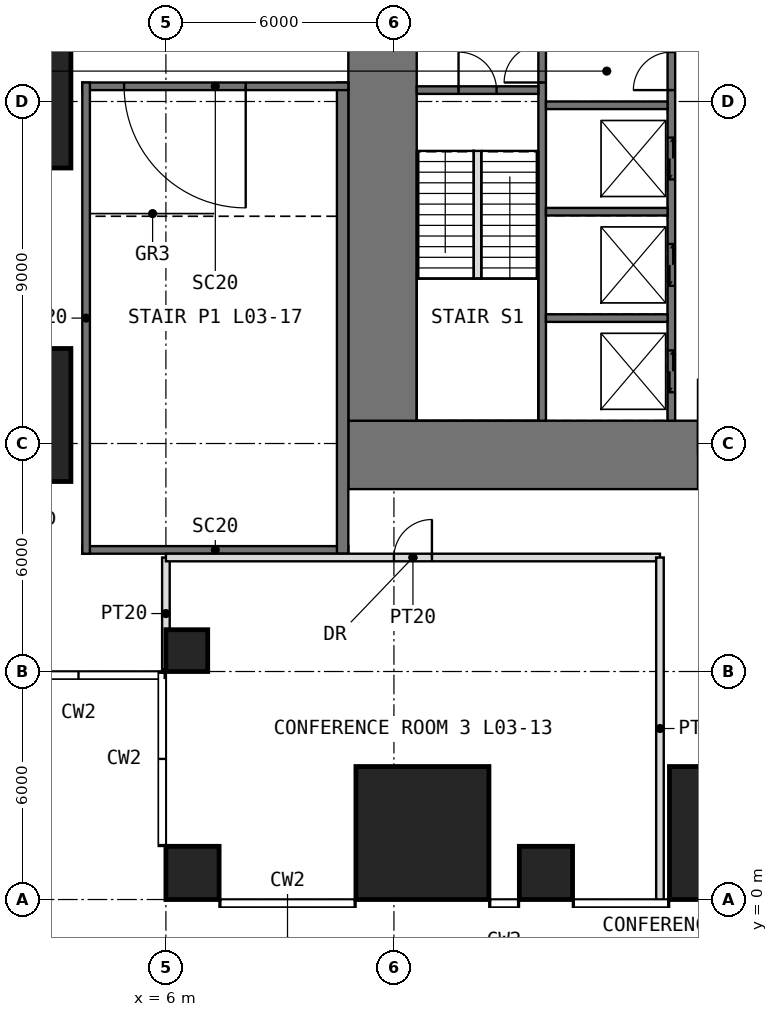
"""IFC4 building model, lengths in metres.
Left out: names, types, materials, properties, quantities, classifications, styles, units other than length and angle.
Written with IfcOpenShell. Run it as: python <this file> out.ifc"""

import sys

from ifc_helpers import new_model, si_unit, direction, frame, frame_2d, origin, origin_2d, place, context, subcontext, project, spatial, rectangle, extrude, element, fill, save


model = new_model("IFC4")
c1 = context("Model", 3, precision=1e-05, world=origin(), true_north=direction((0.0, 1.0)))
c2 = subcontext(c1, "Body", "Model", "MODEL_VIEW")
j1 = project(units=[si_unit("LENGTHUNIT", "METRE"), si_unit("PLANEANGLEUNIT", "RADIAN")], contexts=[c1])
p1 = place(None, origin())
s1 = spatial("IfcSite", under=j1, at=p1, CompositionType="ELEMENT")
p2 = place(p1, origin())
s2 = spatial("IfcBuilding", under=s1, at=p2, CompositionType="ELEMENT")
p3 = place(p2, frame((0.0, 0.0, 18.0)))
s3 = spatial("IfcBuildingStorey", under=s2, at=p3, CompositionType="ELEMENT", Elevation=18.0)
p4 = place(p3, frame((6.7, 0.7, 0.0), z_axis=(0.0, 0.0, 1.0), x_axis=(1.0, 0.0, 0.0)))
e1 = element("IfcColumn", 1, at=p4, inside=s3, PredefinedType="COLUMN", context=c2, shape_type="SweptSolid", body=[
    extrude(rectangle(XDim=1.4, YDim=1.4, at=origin_2d()), origin(), (0.0, 0.0, 1.0), 4.5),
])
p5 = place(p3, frame((12.75, 1.75, 0.0), z_axis=(0.0, 0.0, 1.0), x_axis=(1.0, 0.0, 0.0)))
e2 = element("IfcColumn", 2, at=p5, inside=s3, PredefinedType="COLUMN", context=c2, shape_type="SweptSolid", body=[
    extrude(rectangle(XDim=3.5, YDim=3.5, at=origin_2d()), origin(), (0.0, 0.0, 1.0), 4.5),
])
p6 = place(p3, frame((16.0, 0.7, 0.0), z_axis=(0.0, 0.0, 1.0), x_axis=(1.0, 0.0, 0.0)))
e3 = element("IfcColumn", 3, at=p6, inside=s3, PredefinedType="COLUMN", context=c2, shape_type="SweptSolid", body=[
    extrude(rectangle(XDim=1.4, YDim=1.4, at=origin_2d()), origin(), (0.0, 0.0, 1.0), 4.5),
])
p7 = place(p3, frame((21.0, 1.75, 0.0), z_axis=(0.0, 0.0, 1.0), x_axis=(1.0, 0.0, 0.0)))
e4 = element("IfcColumn", 4, at=p7, inside=s3, PredefinedType="COLUMN", context=c2, shape_type="SweptSolid", body=[
    extrude(rectangle(XDim=3.5, YDim=3.5, at=origin_2d()), origin(), (0.0, 0.0, 1.0), 4.5),
])
p8 = place(p3, frame((6.55, 6.55, 0.0), z_axis=(0.0, 0.0, 1.0), x_axis=(1.0, 0.0, 0.0)))
e5 = element("IfcColumn", 5, at=p8, inside=s3, PredefinedType="COLUMN", context=c2, shape_type="SweptSolid", body=[
    extrude(rectangle(XDim=1.1, YDim=1.1, at=origin_2d()), origin(), (0.0, 0.0, 1.0), 4.5),
])
for number, where, z_axis, x_axis in (
    (6, (1.75, 12.75, 0.0), (0.0, 0.0, 1.0), (1.0, 0.0, 0.0)),
    (7, (1.75, 21.0, 0.0), (0.0, 0.0, 1.0), (1.0, 0.0, 0.0)),
):
    element("IfcColumn", number, at=place(p3, frame(where, z_axis=z_axis, x_axis=x_axis)), inside=s3, PredefinedType="COLUMN", context=c2, shape_type="SweptSolid", body=[
        extrude(rectangle(XDim=3.5, YDim=3.5, at=origin_2d()), origin(), (0.0, 0.0, 1.0), 4.5),
    ])
p9 = place(p3, frame((10.8, 11.7, -0.2), z_axis=(0.0, 0.0, 1.0), x_axis=(1.0, 0.0, 0.0)))
e8 = element("IfcWall", 8, at=p9, inside=s3, PredefinedType="SHEAR", context=c2, shape_type="SweptSolid", body=[
    extrude(rectangle(XDim=20.4, YDim=1.8, at=frame_2d((10.2, 0.0))), origin(), (0.0, 0.0, 1.0), 4.65),
])
p10 = place(p9, frame((9.2, 0.0, 0.2)))
e9 = element("IfcOpeningElement", 9, at=p10, cuts=e8, PredefinedType="OPENING", context=c2, shape_type="SweptSolid", body=[
    extrude(rectangle(XDim=2.0, YDim=2.2, at=frame_2d((1.0, 1.1))), frame((0.0, 0.91, 0.0), z_axis=(0.0, -1.0, 0.0), x_axis=(1.0, 0.0, 0.0)), (0.0, 0.0, 1.0), 1.82),
])
p11 = place(p3, frame((11.7, 12.6, -0.2), z_axis=(0.0, 0.0, 1.0), x_axis=(0.0, 1.0, 0.0)))
e10 = element("IfcWall", 10, at=p11, inside=s3, PredefinedType="SHEAR", context=c2, shape_type="SweptSolid", body=[
    extrude(rectangle(XDim=16.8, YDim=1.8, at=frame_2d((8.4, 0.0))), origin(), (0.0, 0.0, 1.0), 4.65),
])
p12 = place(p11, frame((9.9, 0.0, 0.2)))
e11 = element("IfcOpeningElement", 11, at=p12, cuts=e10, PredefinedType="OPENING", context=c2, shape_type="SweptSolid", body=[
    extrude(rectangle(XDim=1.0, YDim=2.2, at=frame_2d((0.5, 1.1))), frame((0.0, 0.91, 0.0), z_axis=(0.0, -1.0, 0.0), x_axis=(1.0, 0.0, 0.0)), (0.0, 0.0, 1.0), 1.82),
])
p13 = place(p3, frame((15.9, 12.6, -0.2), z_axis=(0.0, 0.0, 1.0), x_axis=(0.0, 1.0, 0.0)))
e12 = element("IfcWall", 12, at=p13, inside=s3, PredefinedType="SHEAR", context=c2, shape_type="SweptSolid", body=[
    extrude(rectangle(XDim=16.8, YDim=0.2, at=frame_2d((8.4, 0.0))), origin(), (0.0, 0.0, 1.0), 4.65),
])
p14 = place(p13, frame((8.9, 0.0, 0.2)))
e13 = element("IfcOpeningElement", 13, at=p14, cuts=e12, PredefinedType="OPENING", context=c2, shape_type="SweptSolid", body=[
    extrude(rectangle(XDim=1.0, YDim=2.2, at=frame_2d((0.5, 1.1))), frame((0.0, 0.11, 0.0), z_axis=(0.0, -1.0, 0.0), x_axis=(1.0, 0.0, 0.0)), (0.0, 0.0, 1.0), 0.22),
])
p15 = place(p3, frame((19.3, 12.6, -0.2), z_axis=(0.0, 0.0, 1.0), x_axis=(0.0, 1.0, 0.0)))
e14 = element("IfcWall", 14, at=p15, inside=s3, PredefinedType="SHEAR", context=c2, shape_type="SweptSolid", body=[
    extrude(rectangle(XDim=16.8, YDim=0.2, at=frame_2d((8.4, 0.0))), origin(), (0.0, 0.0, 1.0), 4.65),
])
p16 = place(p15, frame((8.7, 0.0, 0.2)))
e15 = element("IfcOpeningElement", 15, at=p16, cuts=e14, PredefinedType="OPENING", context=c2, shape_type="SweptSolid", body=[
    extrude(rectangle(XDim=1.0, YDim=2.2, at=frame_2d((0.5, 1.1))), frame((0.0, 0.11, 0.0), z_axis=(0.0, -1.0, 0.0), x_axis=(1.0, 0.0, 0.0)), (0.0, 0.0, 1.0), 0.22),
])
p17 = place(p15, frame((10.85, 0.0, 0.2)))
e16 = element("IfcOpeningElement", 16, at=p17, cuts=e14, PredefinedType="OPENING", context=c2, shape_type="SweptSolid", body=[
    extrude(rectangle(XDim=0.9, YDim=2.2, at=frame_2d((0.45, 1.1))), frame((0.0, 0.11, 0.0), z_axis=(0.0, -1.0, 0.0), x_axis=(1.0, 0.0, 0.0)), (0.0, 0.0, 1.0), 0.22),
])
p18 = place(p15, frame((13.3, 0.0, 0.2)))
e17 = element("IfcOpeningElement", 17, at=p18, cuts=e14, PredefinedType="OPENING", context=c2, shape_type="SweptSolid", body=[
    extrude(rectangle(XDim=1.0, YDim=2.2, at=frame_2d((0.5, 1.1))), frame((0.0, 0.11, 0.0), z_axis=(0.0, -1.0, 0.0), x_axis=(1.0, 0.0, 0.0)), (0.0, 0.0, 1.0), 0.22),
])
p19 = place(p15, frame((15.55, 0.0, 0.2)))
e18 = element("IfcOpeningElement", 18, at=p19, cuts=e14, PredefinedType="OPENING", context=c2, shape_type="SweptSolid", body=[
    extrude(rectangle(XDim=0.9, YDim=2.2, at=frame_2d((0.45, 1.1))), frame((0.0, 0.11, 0.0), z_axis=(0.0, -1.0, 0.0), x_axis=(1.0, 0.0, 0.0)), (0.0, 0.0, 1.0), 0.22),
])
p20 = place(p15, frame((0.75, 0.0, 0.2)))
e19 = element("IfcOpeningElement", 19, at=p20, cuts=e14, PredefinedType="OPENING", context=c2, shape_type="SweptSolid", body=[
    extrude(rectangle(XDim=1.1, YDim=2.2, at=frame_2d((0.55, 1.1))), frame((0.0, 0.11, 0.0), z_axis=(0.0, -1.0, 0.0), x_axis=(1.0, 0.0, 0.0)), (0.0, 0.0, 1.0), 0.22),
])
p21 = place(p15, frame((3.55, 0.0, 0.2)))
e20 = element("IfcOpeningElement", 20, at=p21, cuts=e14, PredefinedType="OPENING", context=c2, shape_type="SweptSolid", body=[
    extrude(rectangle(XDim=1.1, YDim=2.2, at=frame_2d((0.55, 1.1))), frame((0.0, 0.11, 0.0), z_axis=(0.0, -1.0, 0.0), x_axis=(1.0, 0.0, 0.0)), (0.0, 0.0, 1.0), 0.22),
])
p22 = place(p15, frame((6.35, 0.0, 0.2)))
e21 = element("IfcOpeningElement", 21, at=p22, cuts=e14, PredefinedType="OPENING", context=c2, shape_type="SweptSolid", body=[
    extrude(rectangle(XDim=1.1, YDim=2.2, at=frame_2d((0.55, 1.1))), frame((0.0, 0.11, 0.0), z_axis=(0.0, -1.0, 0.0), x_axis=(1.0, 0.0, 0.0)), (0.0, 0.0, 1.0), 0.22),
])
p23 = place(p3, frame((12.6, 21.3, -0.2), z_axis=(0.0, 0.0, 1.0), x_axis=(1.0, 0.0, 0.0)))
e22 = element("IfcWall", 22, at=p23, inside=s3, PredefinedType="SHEAR", context=c2, shape_type="SweptSolid", body=[
    extrude(rectangle(XDim=3.2, YDim=0.2, at=frame_2d((1.6, 0.0))), origin(), (0.0, 0.0, 1.0), 4.65),
])
p24 = place(p23, frame((1.1, 0.0, 0.2)))
e23 = element("IfcOpeningElement", 23, at=p24, cuts=e22, PredefinedType="OPENING", context=c2, shape_type="SweptSolid", body=[
    extrude(rectangle(XDim=1.0, YDim=2.2, at=frame_2d((0.5, 1.1))), frame((0.0, 0.11, 0.0), z_axis=(0.0, -1.0, 0.0), x_axis=(1.0, 0.0, 0.0)), (0.0, 0.0, 1.0), 0.22),
])
for number, where, z_axis, x_axis in (
    (24, (16.0, 15.3, -0.2), (0.0, 0.0, 1.0), (1.0, 0.0, 0.0)),
    (25, (16.0, 18.1, -0.2), (0.0, 0.0, 1.0), (1.0, 0.0, 0.0)),
    (26, (16.0, 20.9, -0.2), (0.0, 0.0, 1.0), (1.0, 0.0, 0.0)),
):
    element("IfcWall", number, at=place(p3, frame(where, z_axis=z_axis, x_axis=x_axis)), inside=s3, PredefinedType="SHEAR", context=c2, shape_type="SweptSolid", body=[
        extrude(rectangle(XDim=3.2, YDim=0.2, at=frame_2d((1.6, 0.0))), origin(), (0.0, 0.0, 1.0), 4.65),
    ])
p25 = place(p3, frame((3.8, 9.2, -0.2), z_axis=(0.0, 0.0, 1.0), x_axis=(1.0, 0.0, 0.0)))
e27 = element("IfcWall", 27, at=p25, inside=s3, PredefinedType="SOLIDWALL", context=c2, shape_type="SweptSolid", body=[
    extrude(rectangle(XDim=7.0, YDim=0.2, at=frame_2d((3.5, 0.0))), origin(), (0.0, 0.0, 1.0), 4.65),
])
p26 = place(p3, frame((10.65, 9.1, -0.2), z_axis=(0.0, 0.0, 1.0), x_axis=(0.0, 1.0, 0.0)))
e28 = element("IfcWall", 28, at=p26, inside=s3, PredefinedType="SOLIDWALL", context=c2, shape_type="SweptSolid", body=[
    extrude(rectangle(XDim=12.4, YDim=0.3, at=frame_2d((6.2, 0.0))), origin(), (0.0, 0.0, 1.0), 4.65),
])
p27 = place(p3, frame((10.8, 21.4, -0.2), z_axis=(0.0, 0.0, 1.0), x_axis=(-1.0, 0.0, 0.0)))
e29 = element("IfcWall", 29, at=p27, inside=s3, PredefinedType="SOLIDWALL", context=c2, shape_type="SweptSolid", body=[
    extrude(rectangle(XDim=7.0, YDim=0.2, at=frame_2d((3.5, 0.0))), origin(), (0.0, 0.0, 1.0), 4.65),
])
p28 = place(p27, frame((2.7, 0.0, 0.2)))
e30 = element("IfcOpeningElement", 30, at=p28, cuts=e29, PredefinedType="OPENING", context=c2, shape_type="SweptSolid", body=[
    extrude(rectangle(XDim=3.2, YDim=2.4, at=frame_2d((1.6, 1.2))), frame((0.0, 0.11, 0.0), z_axis=(0.0, -1.0, 0.0), x_axis=(1.0, 0.0, 0.0)), (0.0, 0.0, 1.0), 0.22),
])
p29 = place(p3, frame((3.9, 21.5, -0.2), z_axis=(0.0, 0.0, 1.0), x_axis=(0.0, -1.0, 0.0)))
e31 = element("IfcWall", 31, at=p29, inside=s3, PredefinedType="SOLIDWALL", context=c2, shape_type="SweptSolid", body=[
    extrude(rectangle(XDim=12.4, YDim=0.2, at=frame_2d((6.2, 0.0))), origin(), (0.0, 0.0, 1.0), 4.65),
])
p30 = place(p3, frame((6.0, 6.05, 0.0), z_axis=(0.0, 0.0, 1.0), x_axis=(0.0, 1.0, 0.0)))
e32 = element("IfcWall", 32, at=p30, inside=s3, PredefinedType="PARTITIONING", context=c2, shape_type="SweptSolid", body=[
    extrude(rectangle(XDim=2.95, YDim=0.2, at=frame_2d((1.475, 0.0))), origin(), (0.0, 0.0, 1.0), 3.63),
])
p31 = place(p3, frame((6.0, 9.0, 0.0), z_axis=(0.0, 0.0, 1.0), x_axis=(1.0, 0.0, 0.0)))
e33 = element("IfcWall", 33, at=p31, inside=s3, PredefinedType="PARTITIONING", context=c2, shape_type="SweptSolid", body=[
    extrude(rectangle(XDim=13.0, YDim=0.2, at=frame_2d((6.5, 0.0))), origin(), (0.0, 0.0, 1.0), 4.25),
])
p32 = place(p31, frame((6.0, 0.0, 0.0)))
e34 = element("IfcOpeningElement", 34, at=p32, cuts=e33, PredefinedType="OPENING", context=c2, shape_type="SweptSolid", body=[
    extrude(rectangle(XDim=1.0, YDim=2.2, at=frame_2d((0.5, 1.1))), frame((0.0, 0.11, 0.0), z_axis=(0.0, -1.0, 0.0), x_axis=(1.0, 0.0, 0.0)), (0.0, 0.0, 1.0), 0.22),
])
p33 = place(p3, frame((19.0, 0.0, 0.0), z_axis=(0.0, 0.0, 1.0), x_axis=(0.0, 1.0, 0.0)))
e35 = element("IfcWall", 35, at=p33, inside=s3, PredefinedType="PARTITIONING", context=c2, shape_type="SweptSolid", body=[
    extrude(rectangle(XDim=9.0, YDim=0.2, at=frame_2d((4.5, 0.0))), origin(), (0.0, 0.0, 1.0), 4.25),
])
p34 = place(p3, frame((14.2, 16.34, 0.0), z_axis=(0.0, 0.0, 1.0), x_axis=(0.0, 1.0, 0.0)))
e36 = element("IfcWall", 36, at=p34, inside=s3, PredefinedType="PARTITIONING", context=c2, shape_type="SweptSolid", body=[
    extrude(rectangle(XDim=3.36, YDim=0.2, at=frame_2d((1.68, 0.0))), origin(), (0.0, 0.0, 1.0), 4.5),
])
p35 = place(p24, origin())
e37 = element("IfcDoor", 37, at=p35, inside=s3, OperationType="SINGLE_SWING_LEFT", PredefinedType="DOOR", context=c2, shape_type="SweptSolid", body=[
    extrude(rectangle(XDim=1.0, YDim=2.2, at=frame_2d((0.5, 1.1))), frame((0.0, 0.025, 0.0), z_axis=(0.0, -1.0, 0.0), x_axis=(1.0, 0.0, 0.0)), (0.0, 0.0, 1.0), 0.05),
])
fill(e23, e37)
p36 = place(p14, origin())
e38 = element("IfcDoor", 38, at=p36, inside=s3, OperationType="SINGLE_SWING_LEFT", PredefinedType="DOOR", context=c2, shape_type="SweptSolid", body=[
    extrude(rectangle(XDim=1.0, YDim=2.2, at=frame_2d((0.5, 1.1))), frame((0.0, 0.025, 0.0), z_axis=(0.0, -1.0, 0.0), x_axis=(1.0, 0.0, 0.0)), (0.0, 0.0, 1.0), 0.05),
])
fill(e13, e38)
p37 = place(p16, origin())
e39 = element("IfcDoor", 39, at=p37, inside=s3, OperationType="SINGLE_SWING_LEFT", PredefinedType="DOOR", context=c2, shape_type="SweptSolid", body=[
    extrude(rectangle(XDim=1.0, YDim=2.2, at=frame_2d((0.5, 1.1))), frame((0.0, 0.025, 0.0), z_axis=(0.0, -1.0, 0.0), x_axis=(1.0, 0.0, 0.0)), (0.0, 0.0, 1.0), 0.05),
])
fill(e15, e39)
p38 = place(p28, origin())
e40 = element("IfcDoor", 40, at=p38, inside=s3, OperationType="DOUBLE_DOOR_SINGLE_SWING", PredefinedType="DOOR", context=c2, shape_type="SweptSolid", body=[
    extrude(rectangle(XDim=3.2, YDim=2.4, at=frame_2d((1.6, 1.2))), frame((0.0, 0.025, 0.0), z_axis=(0.0, -1.0, 0.0), x_axis=(1.0, 0.0, 0.0)), (0.0, 0.0, 1.0), 0.05),
])
fill(e30, e40)
p39 = place(p32, origin())
e41 = element("IfcDoor", 41, at=p39, inside=s3, OperationType="SINGLE_SWING_RIGHT", PredefinedType="DOOR", context=c2, shape_type="SweptSolid", body=[
    extrude(rectangle(XDim=1.0, YDim=2.2, at=frame_2d((0.5, 1.1))), frame((0.0, 0.025, 0.0), z_axis=(0.0, -1.0, 0.0), x_axis=(1.0, 0.0, 0.0)), (0.0, 0.0, 1.0), 0.05),
])
fill(e34, e41)
p40 = place(p20, origin())
e42 = element("IfcDoor", 42, at=p40, inside=s3, OperationType="DOUBLE_DOOR_SLIDING", PredefinedType="DOOR", context=c2, shape_type="SweptSolid", body=[
    extrude(rectangle(XDim=1.1, YDim=2.2, at=frame_2d((0.55, 1.1))), frame((0.0, 0.025, 0.0), z_axis=(0.0, -1.0, 0.0), x_axis=(1.0, 0.0, 0.0)), (0.0, 0.0, 1.0), 0.05),
])
fill(e19, e42)
p41 = place(p21, origin())
e43 = element("IfcDoor", 43, at=p41, inside=s3, OperationType="DOUBLE_DOOR_SLIDING", PredefinedType="DOOR", context=c2, shape_type="SweptSolid", body=[
    extrude(rectangle(XDim=1.1, YDim=2.2, at=frame_2d((0.55, 1.1))), frame((0.0, 0.025, 0.0), z_axis=(0.0, -1.0, 0.0), x_axis=(1.0, 0.0, 0.0)), (0.0, 0.0, 1.0), 0.05),
])
fill(e20, e43)
p42 = place(p22, origin())
e44 = element("IfcDoor", 44, at=p42, inside=s3, OperationType="DOUBLE_DOOR_SLIDING", PredefinedType="DOOR", context=c2, shape_type="SweptSolid", body=[
    extrude(rectangle(XDim=1.1, YDim=2.2, at=frame_2d((0.55, 1.1))), frame((0.0, 0.025, 0.0), z_axis=(0.0, -1.0, 0.0), x_axis=(1.0, 0.0, 0.0)), (0.0, 0.0, 1.0), 0.05),
])
fill(e21, e44)
save(model, sys.argv[1])
